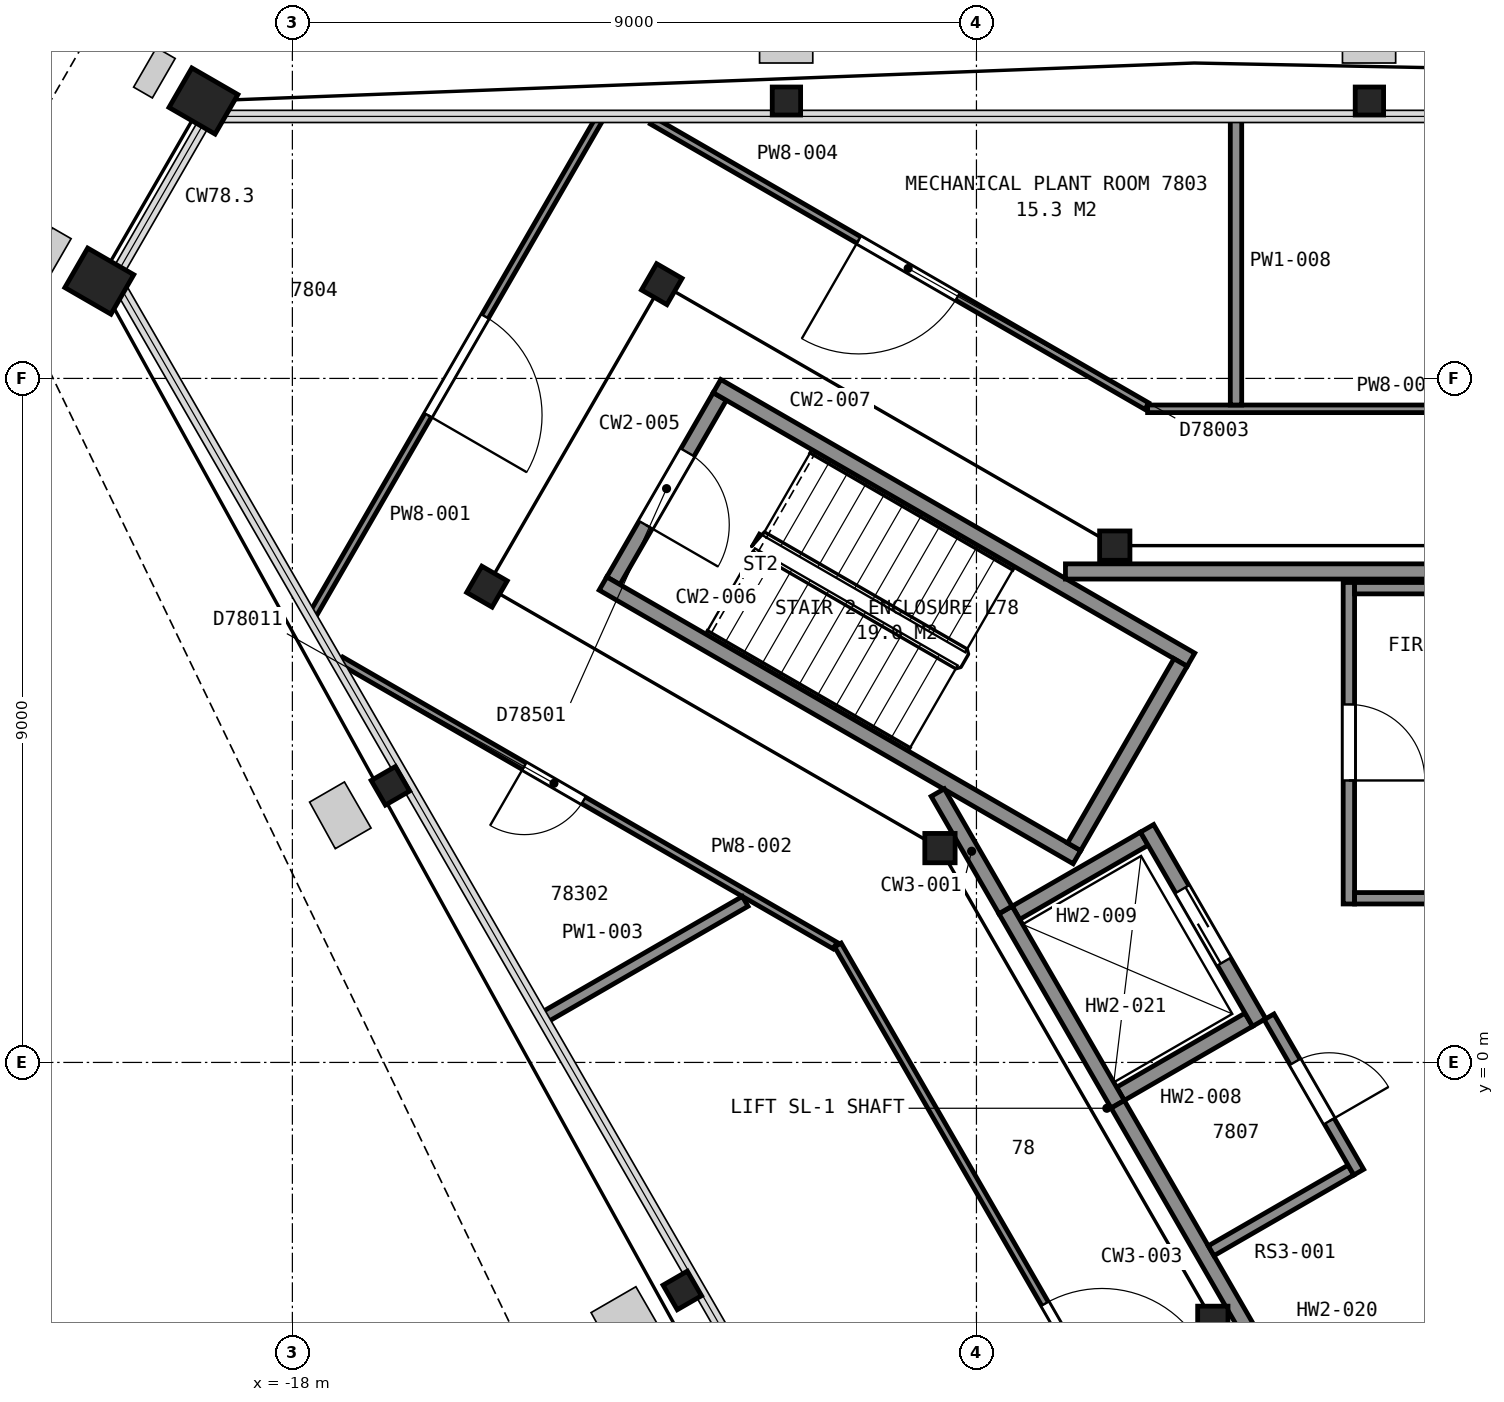
"""IFC4 building model, lengths in metres.
Left out: names, types, materials, properties, quantities, classifications, styles, units other than length and angle.
Written with IfcOpenShell. Run it as: python <this file> out.ifc"""

import sys

from ifc_helpers import new_model, si_unit, direction, frame, frame_2d, origin, origin_2d, place, context, subcontext, project, spatial, rectangle, hollow_rectangle, i_section, extrude, element, fill, save


model = new_model("IFC4")
c1 = context("Model", 3, precision=1e-05, world=origin(), true_north=direction((0.0, 1.0)))
c2 = subcontext(c1, "Body", "Model", "MODEL_VIEW")
j1 = project(units=[si_unit("LENGTHUNIT", "METRE"), si_unit("PLANEANGLEUNIT", "RADIAN")], contexts=[c1])
p1 = place(None, origin())
s1 = spatial("IfcSite", under=j1, at=p1, CompositionType="ELEMENT")
p2 = place(p1, origin())
s2 = spatial("IfcBuilding", under=s1, at=p2, CompositionType="ELEMENT")
p3 = place(p2, frame((0.0, 0.0, 308.4)))
s3 = spatial("IfcBuildingStorey", under=s2, at=p3, CompositionType="ELEMENT", Elevation=308.4)
p4 = place(p3, frame((-3.83, 12.65, 0.045), z_axis=(0.0, 0.0, 1.0), x_axis=(1.0, 0.0, 0.0)))
e1 = element("IfcColumn", 1, at=p4, inside=s3, PredefinedType="COLUMN", context=c2, shape_type="SweptSolid", body=[
    extrude(i_section(OverallWidth=0.373, OverallDepth=0.368, WebThickness=0.015, FlangeThickness=0.024, FilletRadius=0.015, at=origin_2d()), origin(), (0.0, 0.0, 1.0), 4.155),
])
p5 = place(p3, frame((-11.5, 12.65, 0.055), z_axis=(0.0, 0.0, 1.0), x_axis=(1.0, 0.0, 0.0)))
e2 = element("IfcColumn", 2, at=p5, inside=s3, PredefinedType="COLUMN", context=c2, shape_type="SweptSolid", body=[
    extrude(i_section(OverallWidth=0.373, OverallDepth=0.368, WebThickness=0.015, FlangeThickness=0.024, FilletRadius=0.015, at=origin_2d()), origin(), (0.0, 0.0, 1.0), 4.145),
])
for number, where, z_axis, x_axis in (
    (3, (-19.17, 12.65, 0.09), (0.0, 0.0, 1.0), (0.5, 0.866, 0.0)),
    (4, (-20.54, 10.28, 0.09), (0.0, 0.0, 1.0), (0.5, 0.866, 0.0)),
):
    element("IfcColumn", number, at=place(p3, frame(where, z_axis=z_axis, x_axis=x_axis)), inside=s3, PredefinedType="COLUMN", context=c2, shape_type="SweptSolid", body=[
        extrude(hollow_rectangle(XDim=0.6, YDim=0.7, WallThickness=0.04, at=origin_2d()), origin(), (0.0, 0.0, 1.0), 4.11),
    ])
p6 = place(p3, frame((-16.71, 3.64, 0.055), z_axis=(0.0, 0.0, 1.0), x_axis=(-0.5, 0.866025403784, 0.0)))
e5 = element("IfcColumn", 5, at=p6, inside=s3, PredefinedType="COLUMN", context=c2, shape_type="SweptSolid", body=[
    extrude(i_section(OverallWidth=0.373, OverallDepth=0.368, WebThickness=0.015, FlangeThickness=0.024, FilletRadius=0.015, at=origin_2d()), origin(), (0.0, 0.0, 1.0), 4.145),
])
p7 = place(p3, frame((-12.87, -3.0, 0.045), z_axis=(0.0, 0.0, 1.0), x_axis=(-0.5, 0.866025403784, 0.0)))
e6 = element("IfcColumn", 6, at=p7, inside=s3, PredefinedType="COLUMN", context=c2, shape_type="SweptSolid", body=[
    extrude(i_section(OverallWidth=0.373, OverallDepth=0.368, WebThickness=0.015, FlangeThickness=0.024, FilletRadius=0.015, at=origin_2d()), origin(), (0.0, 0.0, 1.0), 4.155),
])
for number, where, z_axis, x_axis in (
    (7, (-7.18, 6.8, 0.0), (0.0, 0.0, 1.0), (1.0, 0.0, 0.0)),
    (8, (-13.14, 10.24, 0.0), (0.0, 0.0, 1.0), (0.5, 0.866, 0.0)),
    (9, (-15.44, 6.26, 0.0), (0.0, 0.0, 1.0), (0.5, 0.866, 0.0)),
    (10, (-9.48, 2.82, 0.0), (0.0, 0.0, 1.0), (1.0, 0.0, 0.0)),
    (11, (-5.89, -3.4, 0.0), (0.0, 0.0, 1.0), (1.0, 0.0, 0.0)),
):
    element("IfcColumn", number, at=place(p3, frame(where, z_axis=z_axis, x_axis=x_axis)), inside=s3, PredefinedType="COLUMN", context=c2, shape_type="SweptSolid", body=[
        extrude(i_section(OverallWidth=0.399, OverallDepth=0.386, WebThickness=0.021, FlangeThickness=0.033, FilletRadius=0.015, at=origin_2d()), origin(), (0.0, 0.0, 1.0), 4.2),
    ])
p8 = place(p3, frame((-12.377, 8.762, 0.0), z_axis=(0.0, 0.0, 1.0), x_axis=(-0.500049511043, -0.865996816683, 0.0)))
e12 = element("IfcWall", 12, at=p8, inside=s3, PredefinedType="PARTITIONING", context=c2, shape_type="SweptSolid", body=[
    extrude(rectangle(XDim=2.8, YDim=0.2, at=frame_2d((1.4, 0.0))), origin(), (0.0, 0.0, 1.0), 3.95),
])
p9 = place(p8, frame((0.85, 0.0, 0.0)))
e13 = element("IfcOpeningElement", 13, at=p9, cuts=e12, PredefinedType="OPENING", context=c2, shape_type="SweptSolid", body=[
    extrude(rectangle(XDim=1.1, YDim=2.1, at=frame_2d((0.55, 1.05))), frame((0.0, 0.11, 0.0), z_axis=(0.0, -1.0, 0.0), x_axis=(1.0, 0.0, 0.0)), (0.0, 0.0, 1.0), 0.22),
])
for number, where, z_axis, x_axis in (
    (14, (-7.678, 2.701, 0.0), (0.0, 0.0, 1.0), (-0.866, 0.5, 0.0)),
    (15, (-6.178, 5.299, 0.0), (0.0, 0.0, 1.0), (-0.866, 0.5, 0.0)),
):
    element("IfcWall", number, at=place(p3, frame(where, z_axis=z_axis, x_axis=x_axis)), inside=s3, PredefinedType="PARTITIONING", context=c2, shape_type="SweptSolid", body=[
        extrude(rectangle(XDim=7.2, YDim=0.2, at=frame_2d((3.6, 0.0))), origin(), (0.0, 0.0, 1.0), 3.95),
    ])
p10 = place(p3, frame((-6.315, 5.262, 0.0), z_axis=(0.0, 0.0, 1.0), x_axis=(-0.500049511043, -0.865996816683, 0.0)))
e16 = element("IfcWall", 16, at=p10, inside=s3, PredefinedType="PARTITIONING", context=c2, shape_type="SweptSolid", body=[
    extrude(rectangle(XDim=2.8, YDim=0.2, at=frame_2d((1.4, 0.0))), origin(), (0.0, 0.0, 1.0), 3.95),
])
for number, where, z_axis, x_axis in (
    (17, (-7.105, -0.413, 0.0), (0.0, 0.0, 1.0), (0.866, 0.5, 0.0)),
    (18, (-8.48, 1.969, 0.0), (0.0, 0.0, 1.0), (0.866, 0.5, 0.0)),
):
    element("IfcWall", number, at=place(p3, frame(where, z_axis=z_axis, x_axis=x_axis)), inside=s3, PredefinedType="PARTITIONING", context=c2, shape_type="SweptSolid", body=[
        extrude(rectangle(XDim=1.95, YDim=0.2, at=frame_2d((0.975, 0.0))), origin(), (0.0, 0.0, 1.0), 4.2),
    ])
p11 = place(p3, frame((-5.28, 0.525, 0.0), z_axis=(0.0, 0.0, 1.0), x_axis=(-0.500037662692, 0.866003658127, 0.0)))
e19 = element("IfcWall", 19, at=p11, inside=s3, PredefinedType="PARTITIONING", context=c2, shape_type="SweptSolid", body=[
    extrude(rectangle(XDim=2.95, YDim=0.2, at=frame_2d((1.475, 0.0))), origin(), (0.0, 0.0, 1.0), 4.2),
])
p12 = place(p11, frame((0.925, 0.0, 0.0)))
e20 = element("IfcOpeningElement", 20, at=p12, cuts=e19, PredefinedType="OPENING", context=c2, shape_type="SweptSolid", body=[
    extrude(rectangle(XDim=1.1, YDim=2.1, at=frame_2d((0.55, 1.05))), frame((0.0, 0.11, 0.0), z_axis=(0.0, -1.0, 0.0), x_axis=(1.0, 0.0, 0.0)), (0.0, 0.0, 1.0), 0.22),
])
p13 = place(p3, frame((-7.142, -0.55, 0.0), z_axis=(0.0, 0.0, 1.0), x_axis=(-0.49997559174, 0.866039495442, 0.0)))
e21 = element("IfcWall", 21, at=p13, inside=s3, PredefinedType="PARTITIONING", context=c2, shape_type="SweptSolid", body=[
    extrude(rectangle(XDim=2.95, YDim=0.2, at=frame_2d((1.475, 0.0))), origin(), (0.0, 0.0, 1.0), 4.2),
])
p14 = place(p3, frame((-9.509, 3.551, 0.0), z_axis=(0.0, 0.0, 1.0), x_axis=(0.499999136801, -0.866025902152, 0.0)))
e22 = element("IfcWall", 22, at=p14, inside=s3, PredefinedType="PARTITIONING", context=c2, shape_type="SweptSolid", body=[
    extrude(rectangle(XDim=1.782, YDim=0.2, at=frame_2d((0.891, 0.0))), origin(), (0.0, 0.0, 1.0), 3.95),
])
p15 = place(p3, frame((7.829, 6.46, 0.0), z_axis=(0.0, 0.0, 1.0), x_axis=(-1.0, 0.0, 0.0)))
e23 = element("IfcWall", 23, at=p15, inside=s3, PredefinedType="PARTITIONING", context=c2, shape_type="SweptSolid", body=[
    extrude(rectangle(XDim=15.658, YDim=0.2, at=frame_2d((7.829, 0.0))), origin(), (0.0, 0.0, 1.0), 3.95),
])
p16 = place(p15, frame((2.618, 0.0, 0.0)))
e24 = element("IfcOpeningElement", 24, at=p16, cuts=e23, PredefinedType="OPENING", context=c2, shape_type="SweptSolid", body=[
    extrude(rectangle(XDim=1.8, YDim=2.1, at=frame_2d((0.9, 1.05))), frame((0.0, 0.11, 0.0), z_axis=(0.0, -1.0, 0.0), x_axis=(1.0, 0.0, 0.0)), (0.0, 0.0, 1.0), 0.22),
])
p17 = place(p3, frame((-7.141, -0.551, 0.0), z_axis=(0.0, 0.0, 1.0), x_axis=(0.500001302854, -0.86602465158, 0.0)))
e25 = element("IfcWall", 25, at=p17, inside=s3, PredefinedType="PARTITIONING", context=c2, shape_type="SweptSolid", body=[
    extrude(rectangle(XDim=6.846, YDim=0.2, at=frame_2d((3.423, 0.0))), origin(), (0.0, 0.0, 1.0), 3.95),
])
p18 = place(p17, frame((4.633, 0.0, 0.0)))
e26 = element("IfcOpeningElement", 26, at=p18, cuts=e25, PredefinedType="OPENING", context=c2, shape_type="SweptSolid", body=[
    extrude(rectangle(XDim=1.8, YDim=2.1, at=frame_2d((0.9, 1.05))), frame((0.0, 0.11, 0.0), z_axis=(0.0, -1.0, 0.0), x_axis=(1.0, 0.0, 0.0)), (0.0, 0.0, 1.0), 0.22),
])
p19 = place(p3, frame((-5.912, -2.478, 0.0), z_axis=(0.0, 0.0, 1.0), x_axis=(0.86611284933, 0.499848509276, 0.0)))
e27 = element("IfcWall", 27, at=p19, inside=s3, PredefinedType="PARTITIONING", context=c2, shape_type="SweptSolid", body=[
    extrude(rectangle(XDim=2.124, YDim=0.15, at=frame_2d((1.062, 0.0))), origin(), (0.0, 0.0, 1.0), 3.95),
])
p20 = place(p3, frame((-3.97, -1.444, 0.0), z_axis=(0.0, 0.0, 1.0), x_axis=(-0.499955275397, 0.866051224006, 0.0)))
e28 = element("IfcWall", 28, at=p20, inside=s3, PredefinedType="PARTITIONING", context=c2, shape_type="SweptSolid", body=[
    extrude(rectangle(XDim=2.36, YDim=0.15, at=frame_2d((1.18, 0.0))), origin(), (0.0, 0.0, 1.0), 3.95),
])
p21 = place(p20, frame((0.775, 0.0, 0.0)))
e29 = element("IfcOpeningElement", 29, at=p21, cuts=e28, PredefinedType="OPENING", context=c2, shape_type="SweptSolid", body=[
    extrude(rectangle(XDim=0.9, YDim=2.1, at=frame_2d((0.45, 1.05))), frame((0.0, 0.085, 0.0), z_axis=(0.0, -1.0, 0.0), x_axis=(1.0, 0.0, 0.0)), (0.0, 0.0, 1.0), 0.17),
])
p22 = place(p3, frame((-4.1, 2.085, 0.0), z_axis=(0.0, 0.0, 1.0), x_axis=(0.0, 1.0, 0.0)))
e30 = element("IfcWall", 30, at=p22, inside=s3, PredefinedType="PARTITIONING", context=c2, shape_type="SweptSolid", body=[
    extrude(rectangle(XDim=4.23, YDim=0.15, at=frame_2d((2.115, 0.0))), origin(), (0.0, 0.0, 1.0), 3.95),
])
p23 = place(p22, frame((1.625, 0.0, 0.0)))
e31 = element("IfcOpeningElement", 31, at=p23, cuts=e30, PredefinedType="OPENING", context=c2, shape_type="SweptSolid", body=[
    extrude(rectangle(XDim=1.0, YDim=2.1, at=frame_2d((0.5, 1.05))), frame((0.0, 0.085, 0.0), z_axis=(0.0, -1.0, 0.0), x_axis=(1.0, 0.0, 0.0)), (0.0, 0.0, 1.0), 0.17),
])
p24 = place(p3, frame((-4.025, 2.16, 0.0), z_axis=(0.0, 0.0, 1.0), x_axis=(1.0, 0.0, 0.0)))
e32 = element("IfcWall", 32, at=p24, inside=s3, PredefinedType="PARTITIONING", context=c2, shape_type="SweptSolid", body=[
    extrude(rectangle(XDim=1.238, YDim=0.15, at=frame_2d((0.619, 0.0))), origin(), (0.0, 0.0, 1.0), 3.95),
])
p25 = place(p3, frame((-4.025, 6.24, 0.0), z_axis=(0.0, 0.0, 1.0), x_axis=(1.0, 0.0, 0.0)))
e33 = element("IfcWall", 33, at=p25, inside=s3, PredefinedType="PARTITIONING", context=c2, shape_type="SweptSolid", body=[
    extrude(rectangle(XDim=3.63, YDim=0.15, at=frame_2d((1.815, 0.0))), origin(), (0.0, 0.0, 1.0), 3.95),
])
p26 = place(p3, frame((-17.73, 5.894, 0.0), z_axis=(0.0, 0.0, 1.0), x_axis=(0.500350572687, 0.865822905918, 0.0)))
e34 = element("IfcWall", 34, at=p26, inside=s3, PredefinedType="PARTITIONING", context=c2, shape_type="SweptSolid", body=[
    extrude(rectangle(XDim=7.524, YDim=0.1, at=frame_2d((3.762, 0.0))), origin(), (0.0, 0.0, 1.0), 3.297),
])
p27 = place(p26, frame((3.029, 0.0, 0.0)))
e35 = element("IfcOpeningElement", 35, at=p27, cuts=e34, PredefinedType="OPENING", context=c2, shape_type="SweptSolid", body=[
    extrude(rectangle(XDim=1.5, YDim=2.1, at=frame_2d((0.75, 1.05))), frame((0.0, 0.06, 0.0), z_axis=(0.0, -1.0, 0.0), x_axis=(1.0, 0.0, 0.0)), (0.0, 0.0, 1.0), 0.12),
])
p28 = place(p3, frame((-10.859, 1.537, 0.0), z_axis=(0.0, 0.0, 1.0), x_axis=(-0.866105995393, 0.499860385252, 0.0)))
e36 = element("IfcWall", 36, at=p28, inside=s3, PredefinedType="PARTITIONING", context=c2, shape_type="SweptSolid", body=[
    extrude(rectangle(XDim=7.508, YDim=0.1, at=frame_2d((3.754, 0.0))), origin(), (0.0, 0.0, 1.0), 3.297),
])
p29 = place(p28, frame((3.822, 0.0, 0.0)))
e37 = element("IfcOpeningElement", 37, at=p29, cuts=e36, PredefinedType="OPENING", context=c2, shape_type="SweptSolid", body=[
    extrude(rectangle(XDim=0.9, YDim=2.1, at=frame_2d((0.45, 1.05))), frame((0.0, 0.06, 0.0), z_axis=(0.0, -1.0, 0.0), x_axis=(1.0, 0.0, 0.0)), (0.0, 0.0, 1.0), 0.12),
])
p30 = place(p3, frame((-14.696, 0.588, 0.0), z_axis=(0.0, 0.0, 1.0), x_axis=(0.866116586143, 0.499842034255, 0.0)))
e38 = element("IfcWall", 38, at=p30, inside=s3, PredefinedType="PARTITIONING", context=c2, shape_type="SweptSolid", body=[
    extrude(rectangle(XDim=3.063, YDim=0.15, at=frame_2d((1.532, 0.0))), origin(), (0.0, 0.0, 1.0), 3.297),
])
p31 = place(p3, frame((-13.265, 12.391, 0.0), z_axis=(0.0, 0.0, 1.0), x_axis=(0.866073029218, -0.499917501255, 0.0)))
e39 = element("IfcWall", 39, at=p31, inside=s3, PredefinedType="PARTITIONING", context=c2, shape_type="SweptSolid", body=[
    extrude(rectangle(XDim=7.512, YDim=0.1, at=frame_2d((3.756, 0.0))), origin(), (0.0, 0.0, 1.0), 3.297),
])
p32 = place(p31, frame((3.137, 0.0, 0.0)))
e40 = element("IfcOpeningElement", 40, at=p32, cuts=e39, PredefinedType="OPENING", context=c2, shape_type="SweptSolid", body=[
    extrude(rectangle(XDim=1.5, YDim=2.1, at=frame_2d((0.75, 1.05))), frame((0.0, 0.06, 0.0), z_axis=(0.0, -1.0, 0.0), x_axis=(1.0, 0.0, 0.0)), (0.0, 0.0, 1.0), 0.12),
])
p33 = place(p3, frame((-4.075, -10.145, 0.0), z_axis=(0.0, 0.0, 1.0), x_axis=(-0.499912942625, 0.866075660549, 0.0)))
e41 = element("IfcWall", 41, at=p33, inside=s3, PredefinedType="PARTITIONING", context=c2, shape_type="SweptSolid", body=[
    extrude(rectangle(XDim=13.499, YDim=0.1, at=frame_2d((6.749, 0.0))), origin(), (0.0, 0.0, 1.0), 3.297),
])
p34 = place(p33, frame((6.548, 0.0, 0.0)))
e42 = element("IfcOpeningElement", 42, at=p34, cuts=e41, PredefinedType="OPENING", context=c2, shape_type="SweptSolid", body=[
    extrude(rectangle(XDim=1.5, YDim=2.1, at=frame_2d((0.75, 1.05))), frame((0.0, 0.06, 0.0), z_axis=(0.0, -1.0, 0.0), x_axis=(1.0, 0.0, 0.0)), (0.0, 0.0, 1.0), 0.12),
])
p35 = place(p3, frame((-6.748, 8.6, 0.0), z_axis=(0.0, 0.0, 1.0), x_axis=(1.0, 0.0, 0.0)))
e43 = element("IfcWall", 43, at=p35, inside=s3, PredefinedType="PARTITIONING", context=c2, shape_type="SweptSolid", body=[
    extrude(rectangle(XDim=13.496, YDim=0.1, at=frame_2d((6.748, 0.0))), origin(), (0.0, 0.0, 1.0), 3.297),
])
p36 = place(p35, frame((6.563, 0.0, 0.0)))
e44 = element("IfcOpeningElement", 44, at=p36, cuts=e43, PredefinedType="OPENING", context=c2, shape_type="SweptSolid", body=[
    extrude(rectangle(XDim=1.5, YDim=2.1, at=frame_2d((0.75, 1.05))), frame((0.0, 0.06, 0.0), z_axis=(0.0, -1.0, 0.0), x_axis=(1.0, 0.0, 0.0)), (0.0, 0.0, 1.0), 0.12),
])
p37 = place(p3, frame((-5.585, 8.65, 0.0), z_axis=(0.0, 0.0, 1.0), x_axis=(0.0, 1.0, 0.0)))
e45 = element("IfcWall", 45, at=p37, inside=s3, PredefinedType="PARTITIONING", context=c2, shape_type="SweptSolid", body=[
    extrude(rectangle(XDim=3.783, YDim=0.15, at=frame_2d((1.892, 0.0))), origin(), (0.0, 0.0, 1.0), 3.297),
])
p38 = place(p9, origin())
e46 = element("IfcDoor", 46, at=p38, inside=s3, OperationType="SINGLE_SWING_RIGHT", PredefinedType="DOOR", context=c2, shape_type="SweptSolid", body=[
    extrude(rectangle(XDim=1.1, YDim=2.1, at=frame_2d((0.55, 1.05))), frame((0.0, 0.025, 0.0), z_axis=(0.0, -1.0, 0.0), x_axis=(1.0, 0.0, 0.0)), (0.0, 0.0, 1.0), 0.05),
])
fill(e13, e46)
p39 = place(p12, origin())
e47 = element("IfcDoor", 47, at=p39, inside=s3, OperationType="SLIDING_TO_LEFT", PredefinedType="DOOR", context=c2, shape_type="SweptSolid", body=[
    extrude(rectangle(XDim=1.1, YDim=2.1, at=frame_2d((0.55, 1.05))), frame((0.0, 0.025, 0.0), z_axis=(0.0, -1.0, 0.0), x_axis=(1.0, 0.0, 0.0)), (0.0, 0.0, 1.0), 0.05),
])
fill(e20, e47)
p40 = place(p21, origin())
e48 = element("IfcDoor", 48, at=p40, inside=s3, OperationType="SINGLE_SWING_LEFT", PredefinedType="DOOR", context=c2, shape_type="SweptSolid", body=[
    extrude(rectangle(XDim=0.9, YDim=2.1, at=frame_2d((0.45, 1.05))), frame((0.0, 0.025, 0.0), z_axis=(0.0, -1.0, 0.0), x_axis=(1.0, 0.0, 0.0)), (0.0, 0.0, 1.0), 0.05),
])
fill(e29, e48)
p41 = place(p23, origin())
e49 = element("IfcDoor", 49, at=p41, inside=s3, OperationType="SINGLE_SWING_LEFT", PredefinedType="DOOR", context=c2, shape_type="SweptSolid", body=[
    extrude(rectangle(XDim=1.0, YDim=2.1, at=frame_2d((0.5, 1.05))), frame((0.0, 0.025, 0.0), z_axis=(0.0, -1.0, 0.0), x_axis=(1.0, 0.0, 0.0)), (0.0, 0.0, 1.0), 0.05),
])
fill(e31, e49)
p42 = place(p27, origin())
e50 = element("IfcDoor", 50, at=p42, inside=s3, OperationType="DOUBLE_DOOR_SINGLE_SWING", PredefinedType="DOOR", context=c2, shape_type="SweptSolid", body=[
    extrude(rectangle(XDim=1.5, YDim=2.1, at=frame_2d((0.75, 1.05))), frame((0.0, 0.025, 0.0), z_axis=(0.0, -1.0, 0.0), x_axis=(1.0, 0.0, 0.0)), (0.0, 0.0, 1.0), 0.05),
])
fill(e35, e50)
p43 = place(p29, origin())
e51 = element("IfcDoor", 51, at=p43, inside=s3, OperationType="SINGLE_SWING_RIGHT", PredefinedType="DOOR", context=c2, shape_type="SweptSolid", body=[
    extrude(rectangle(XDim=0.9, YDim=2.1, at=frame_2d((0.45, 1.05))), frame((0.0, 0.025, 0.0), z_axis=(0.0, -1.0, 0.0), x_axis=(1.0, 0.0, 0.0)), (0.0, 0.0, 1.0), 0.05),
])
fill(e37, e51)
p44 = place(p32, origin())
e52 = element("IfcDoor", 52, at=p44, inside=s3, OperationType="DOUBLE_DOOR_SINGLE_SWING", PredefinedType="DOOR", context=c2, shape_type="SweptSolid", body=[
    extrude(rectangle(XDim=1.5, YDim=2.1, at=frame_2d((0.75, 1.05))), frame((0.0, 0.025, 0.0), z_axis=(0.0, -1.0, 0.0), x_axis=(1.0, 0.0, 0.0)), (0.0, 0.0, 1.0), 0.05),
])
fill(e40, e52)
p45 = place(p34, origin())
e53 = element("IfcDoor", 53, at=p45, inside=s3, OperationType="DOUBLE_DOOR_SINGLE_SWING", PredefinedType="DOOR", context=c2, shape_type="SweptSolid", body=[
    extrude(rectangle(XDim=1.5, YDim=2.1, at=frame_2d((0.75, 1.05))), frame((0.0, 0.025, 0.0), z_axis=(0.0, -1.0, 0.0), x_axis=(1.0, 0.0, 0.0)), (0.0, 0.0, 1.0), 0.05),
])
fill(e42, e53)
save(model, sys.argv[1])
